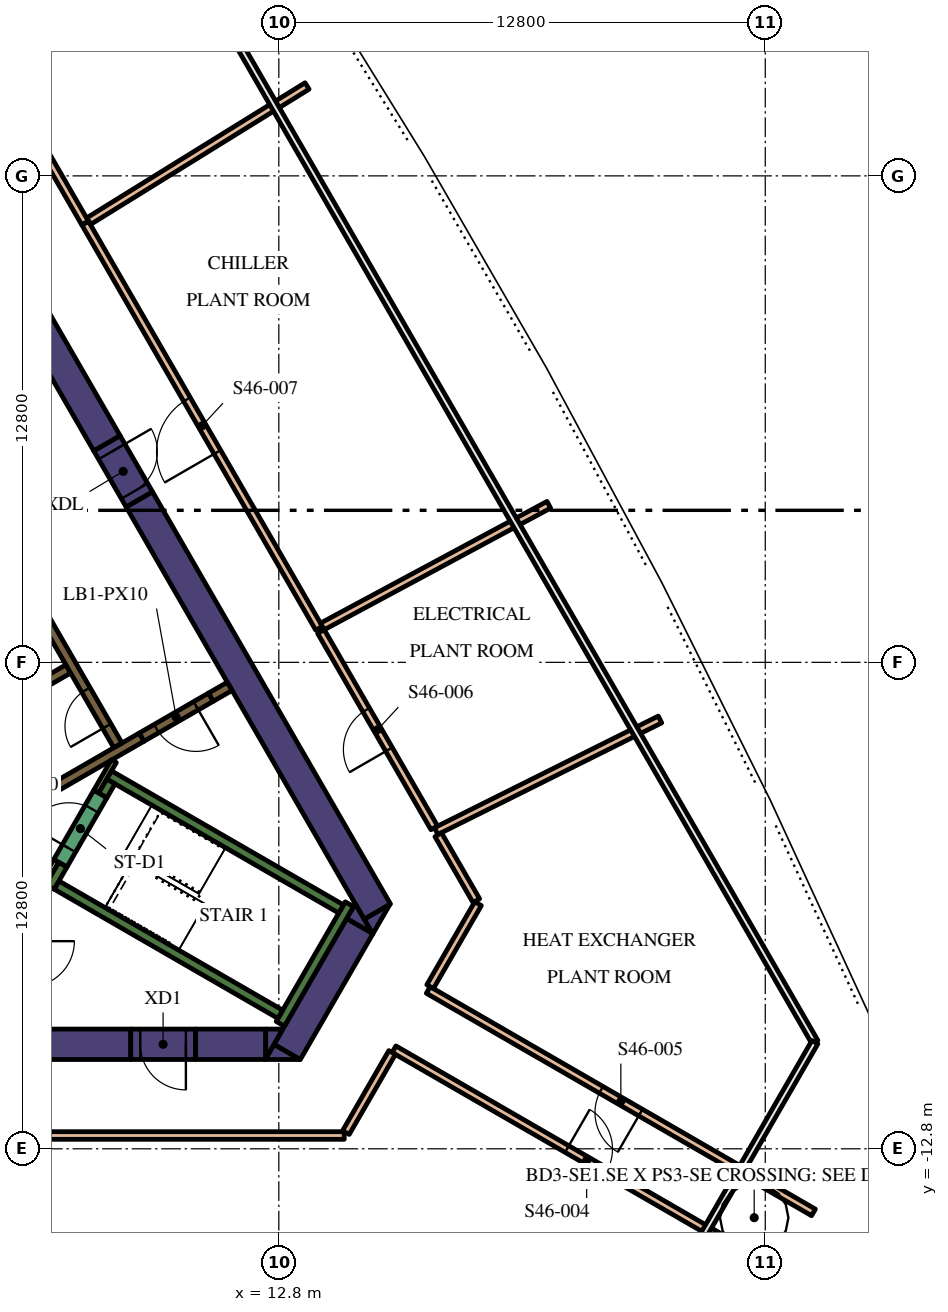
"""IFC4 building model, lengths in metres.
Left out: names, types, materials, properties, quantities, classifications, styles, units other than length and angle.
Written with IfcOpenShell. Run it as: python <this file> out.ifc"""

import sys

from ifc_helpers import new_model, si_unit, direction, frame, frame_2d, origin, place, context, subcontext, project, spatial, polyline, rectangle, outline, extrude, element, fill, save


model = new_model("IFC4")
c1 = context("Model", 3, precision=1e-05, world=origin(), true_north=direction((0.0, 1.0)))
c2 = subcontext(c1, "Body", "Model", "MODEL_VIEW")
j1 = project(units=[si_unit("LENGTHUNIT", "METRE"), si_unit("PLANEANGLEUNIT", "RADIAN")], contexts=[c1])
p1 = place(None, origin())
s1 = spatial("IfcSite", under=j1, at=p1, CompositionType="ELEMENT")
p2 = place(p1, origin())
s2 = spatial("IfcBuilding", under=s1, at=p2, CompositionType="ELEMENT")
p3 = place(p2, frame((0.0, 0.0, 196.2)))
s3 = spatial("IfcBuildingStorey", under=s2, at=p3, CompositionType="ELEMENT", Elevation=196.2)
p4 = place(p3, frame((9.129, 4.289, 0.0), z_axis=(0.0, 0.0, 1.0), x_axis=(0.499995742806, -0.866027861663, 0.0)))
e1 = element("IfcWall", 1, at=p4, inside=s3, PredefinedType="SOLIDWALL", context=c2, shape_type="SweptSolid", body=[
    extrude(rectangle(XDim=12.527, YDim=0.8, at=frame_2d((6.264, 0.0))), origin(), (0.0, 0.0, 1.0), 5.4),
])
p5 = place(p3, origin())
e2 = element("IfcWall", 2, at=p5, inside=s3, PredefinedType="SOLIDWALL", context=c2, shape_type="SweptSolid", body=[
    extrude(outline(polyline([(15.271, -7.15), (15.047, -6.762), (15.719, -6.374), (15.271, -7.15)])), origin(), (0.0, 0.0, 1.0), 5.4),
])
p6 = place(p3, frame((13.018, -10.252, 0.0), z_axis=(0.0, 0.0, 1.0), x_axis=(0.499984020225, 0.866034629516, 0.0)))
e3 = element("IfcWall", 3, at=p6, inside=s3, PredefinedType="SOLIDWALL", context=c2, shape_type="SweptSolid", body=[
    extrude(rectangle(XDim=3.824, YDim=0.8, at=frame_2d((1.912, 0.0))), origin(), (0.0, 0.0, 1.0), 5.4),
])
e4 = element("IfcWall", 4, at=p5, inside=s3, PredefinedType="SOLIDWALL", context=c2, shape_type="SweptSolid", body=[
    extrude(outline(polyline([(12.442, -10.45), (12.671, -10.053), (13.358, -10.45), (12.442, -10.45)])), origin(), (0.0, 0.0, 1.0), 5.4),
])
e5 = element("IfcWall", 5, at=p5, inside=s3, PredefinedType="SOLIDWALL", context=c2, shape_type="SweptSolid", body=[
    extrude(outline(polyline([(14.809, -6.35), (15.257, -7.126), (14.585, -6.738), (14.809, -6.35)])), origin(), (0.0, 0.0, 1.0), 5.4),
])
p7 = place(p3, frame((10.604, -10.05, 0.0), z_axis=(0.0, 0.0, 1.0), x_axis=(1.0, 0.0, 0.0)))
e6 = element("IfcWall", 6, at=p7, inside=s3, PredefinedType="SOLIDWALL", context=c2, shape_type="SweptSolid", body=[
    extrude(rectangle(XDim=1.849, YDim=0.8, at=frame_2d((0.925, 0.0))), origin(), (0.0, 0.0, 1.0), 5.4),
])
e7 = element("IfcWall", 7, at=p5, inside=s3, PredefinedType="SOLIDWALL", context=c2, shape_type="SweptSolid", body=[
    extrude(outline(polyline([(12.904, -9.65), (12.456, -10.426), (12.456, -9.65), (12.904, -9.65)])), origin(), (0.0, 0.0, 1.0), 5.4),
])
p8 = place(p3, frame((8.279, 5.761, 0.0), z_axis=(0.0, 0.0, 1.0), x_axis=(-0.500010359015, 0.866019422922, 0.0)))
e8 = element("IfcWall", 8, at=p8, inside=s3, PredefinedType="SOLIDWALL", context=c2, shape_type="SweptSolid", body=[
    extrude(rectangle(XDim=12.528, YDim=0.8, at=frame_2d((6.264, 0.0))), origin(), (0.0, 0.0, 1.0), 5.4),
])
p9 = place(p3, frame((-13.378, -10.05, 0.0), z_axis=(0.0, 0.0, 1.0), x_axis=(1.0, 0.0, 0.0)))
e9 = element("IfcWall", 9, at=p9, inside=s3, PredefinedType="SOLIDWALL", context=c2, shape_type="SweptSolid", body=[
    extrude(rectangle(XDim=22.282, YDim=0.8, at=frame_2d((11.141, 0.0))), origin(), (0.0, 0.0, 1.0), 5.4),
])
p10 = place(p3, frame((12.84, -9.511, 0.0), z_axis=(0.0, 0.0, 1.0), x_axis=(0.499997733992, 0.866026712061, 0.0)))
e10 = element("IfcWall", 10, at=p10, inside=s3, PredefinedType="SOLIDWALL", context=c2, shape_type="SweptSolid", body=[
    extrude(rectangle(XDim=3.634, YDim=0.25, at=frame_2d((1.817, 0.0))), origin(), (0.0, 0.0, 1.0), 5.4),
])
p11 = place(p3, frame((12.84, -9.261, 0.0), z_axis=(0.0, 0.0, 1.0), x_axis=(-0.866013990052, 0.500019768644, 0.0)))
e11 = element("IfcWall", 11, at=p11, inside=s3, PredefinedType="SOLIDWALL", context=c2, shape_type="SweptSolid", body=[
    extrude(rectangle(XDim=6.8, YDim=0.25, at=frame_2d((3.4, 0.0))), origin(), (0.0, 0.0, 1.0), 5.4),
])
p12 = place(p3, frame((6.78, -5.906, 0.0), z_axis=(0.0, 0.0, 1.0), x_axis=(0.500223362819, 0.865896406789, 0.0)))
e12 = element("IfcWall", 12, at=p12, inside=s3, PredefinedType="SOLIDWALL", context=c2, shape_type="SweptSolid", body=[
    extrude(rectangle(XDim=0.675, YDim=0.25, at=frame_2d((0.337, 0.0))), origin(), (0.0, 0.0, 1.0), 5.4),
])
p13 = place(p3, frame((8.334, -2.964, 0.0), z_axis=(0.0, 0.0, 1.0), x_axis=(0.866016039709, -0.500016218704, 0.0)))
e13 = element("IfcWall", 13, at=p13, inside=s3, PredefinedType="SOLIDWALL", context=c2, shape_type="SweptSolid", body=[
    extrude(rectangle(XDim=7.05, YDim=0.25, at=frame_2d((3.525, 0.0))), origin(), (0.0, 0.0, 1.0), 5.4),
])
p14 = place(p3, frame((8.168, -3.503, 0.0), z_axis=(0.0, 0.0, 1.0), x_axis=(0.49972245349, 0.866185586049, 0.0)))
e14 = element("IfcWall", 14, at=p14, inside=s3, PredefinedType="SOLIDWALL", context=c2, shape_type="SweptSolid", body=[
    extrude(rectangle(XDim=0.425, YDim=0.25, at=frame_2d((0.212, 0.0))), origin(), (0.0, 0.0, 1.0), 5.4),
])
p15 = place(p3, frame((9.19, -1.969, 0.0), z_axis=(0.0, 0.0, 1.0), x_axis=(-0.866057109641, -0.499945079824, 0.0)))
e15 = element("IfcWall", 15, at=p15, inside=s3, PredefinedType="SOLIDWALL", context=c2, shape_type="SweptSolid", body=[
    extrude(rectangle(XDim=3.291, YDim=0.25, at=frame_2d((1.646, 0.0))), origin(), (0.0, 0.0, 1.0), 5.4),
])
p16 = place(p3, frame((11.507, -0.631, 0.0), z_axis=(0.0, 0.0, 1.0), x_axis=(-0.866093731455, -0.499881634324, 0.0)))
e16 = element("IfcWall", 16, at=p16, inside=s3, PredefinedType="SOLIDWALL", context=c2, shape_type="SweptSolid", body=[
    extrude(rectangle(XDim=0.575, YDim=0.25, at=frame_2d((0.288, 0.0))), origin(), (0.0, 0.0, 1.0), 5.4),
])
p17 = place(p3, frame((5.354, -1.274, 0.0), z_axis=(0.0, 0.0, 1.0), x_axis=(0.866008176907, 0.50002983664, 0.0)))
e17 = element("IfcWall", 17, at=p17, inside=s3, PredefinedType="SOLIDWALL", context=c2, shape_type="SweptSolid", body=[
    extrude(rectangle(XDim=2.2, YDim=0.25, at=frame_2d((1.1, 0.0))), origin(), (0.0, 0.0, 1.0), 5.4),
])
p18 = place(p3, frame((6.945, -5.222, 0.0), z_axis=(0.0, 0.0, 1.0), x_axis=(-0.499818422106, -0.866130212453, 0.0)))
e18 = element("IfcWall", 18, at=p18, inside=s3, PredefinedType="PARTITIONING", context=c2, shape_type="SweptSolid", body=[
    extrude(rectangle(XDim=0.514, YDim=0.15, at=frame_2d((0.257, 0.0))), origin(), (0.0, 0.0, 1.0), 4.65),
])
p19 = place(p3, frame((8.459, -2.599, 0.0), z_axis=(0.0, 0.0, 1.0), x_axis=(-0.500041054325, -0.866001699761, 0.0)))
e19 = element("IfcWall", 19, at=p19, inside=s3, PredefinedType="PARTITIONING", context=c2, shape_type="SweptSolid", body=[
    extrude(rectangle(XDim=0.929, YDim=0.15, at=frame_2d((0.464, 0.0))), origin(), (0.0, 0.0, 1.0), 5.4),
])
p20 = place(p3, frame((8.565, -2.185, 0.0), z_axis=(0.0, 0.0, 1.0), x_axis=(-0.499997954832, 0.866026584559, 0.0)))
e20 = element("IfcWall", 20, at=p20, inside=s3, PredefinedType="SOLIDWALL", context=c2, shape_type="SweptSolid", body=[
    extrude(rectangle(XDim=12.35, YDim=0.25, at=frame_2d((6.175, 0.0))), origin(), (0.0, 0.0, 1.0), 5.4),
])
p21 = place(p20, frame((0.585, 0.0, 0.0)))
e21 = element("IfcOpeningElement", 21, at=p21, cuts=e20, PredefinedType="OPENING", context=c2, shape_type="SweptSolid", body=[
    extrude(rectangle(XDim=1.1, YDim=2.1, at=frame_2d((0.55, 1.05))), frame((0.0, 0.135, 0.0), z_axis=(0.0, -1.0, 0.0), x_axis=(1.0, 0.0, 0.0)), (0.0, 0.0, 1.0), 0.27),
])
p22 = place(p3, frame((7.053, -5.284, 0.0), z_axis=(0.0, 0.0, 1.0), x_axis=(0.500078061341, 0.865980330357, 0.0)))
e22 = element("IfcWall", 22, at=p22, inside=s3, PredefinedType="SOLIDWALL", context=c2, shape_type="SweptSolid", body=[
    extrude(rectangle(XDim=2.1, YDim=0.4, at=frame_2d((1.05, 0.0))), origin(), (0.0, 0.0, 1.0), 5.4),
])
p23 = place(p22, frame((0.45, 0.0, 0.0)))
e23 = element("IfcOpeningElement", 23, at=p23, cuts=e22, PredefinedType="OPENING", context=c2, shape_type="SweptSolid", body=[
    extrude(rectangle(XDim=1.2, YDim=2.1, at=frame_2d((0.6, 1.05))), frame((0.0, 0.21, 0.0), z_axis=(0.0, -1.0, 0.0), x_axis=(1.0, 0.0, 0.0)), (0.0, 0.0, 1.0), 0.42),
])
p24 = place(p3, frame((11.009, -0.919, 0.0), z_axis=(0.0, 0.0, 1.0), x_axis=(-0.866059744384, -0.49994051562, 0.0)))
e24 = element("IfcWall", 24, at=p24, inside=s3, PredefinedType="SOLIDWALL", context=c2, shape_type="SweptSolid", body=[
    extrude(rectangle(XDim=2.1, YDim=0.25, at=frame_2d((1.05, 0.0))), origin(), (0.0, 0.0, 1.0), 5.4),
])
p25 = place(p24, frame((0.45, 0.0, 0.0)))
e25 = element("IfcOpeningElement", 25, at=p25, cuts=e24, PredefinedType="OPENING", context=c2, shape_type="SweptSolid", body=[
    extrude(rectangle(XDim=1.2, YDim=2.1, at=frame_2d((0.6, 1.05))), frame((0.0, 0.135, 0.0), z_axis=(0.0, -1.0, 0.0), x_axis=(1.0, 0.0, 0.0)), (0.0, 0.0, 1.0), 0.27),
])
p26 = place(p3, frame((10.604, -10.05, 0.0), z_axis=(0.0, 0.0, 1.0), x_axis=(-1.0, 0.0, 0.0)))
e26 = element("IfcWall", 26, at=p26, inside=s3, PredefinedType="SOLIDWALL", context=c2, shape_type="SweptSolid", body=[
    extrude(rectangle(XDim=1.7, YDim=0.8, at=frame_2d((0.85, 0.0))), origin(), (0.0, 0.0, 1.0), 5.4),
])
p27 = place(p26, frame((0.25, 0.0, 0.0)))
e27 = element("IfcOpeningElement", 27, at=p27, cuts=e26, PredefinedType="OPENING", context=c2, shape_type="SweptSolid", body=[
    extrude(rectangle(XDim=1.2, YDim=2.1, at=frame_2d((0.6, 1.05))), frame((0.0, 0.41, 0.0), z_axis=(0.0, -1.0, 0.0), x_axis=(1.0, 0.0, 0.0)), (0.0, 0.0, 1.0), 0.82),
])
p28 = place(p3, frame((8.279, 5.761, 0.0), z_axis=(0.0, 0.0, 1.0), x_axis=(0.500062241894, -0.865989465428, 0.0)))
e28 = element("IfcWall", 28, at=p28, inside=s3, PredefinedType="SOLIDWALL", context=c2, shape_type="SweptSolid", body=[
    extrude(rectangle(XDim=1.7, YDim=0.8, at=frame_2d((0.85, 0.0))), origin(), (0.0, 0.0, 1.0), 5.4),
])
p29 = place(p28, frame((0.25, 0.0, 0.0)))
e29 = element("IfcOpeningElement", 29, at=p29, cuts=e28, PredefinedType="OPENING", context=c2, shape_type="SweptSolid", body=[
    extrude(rectangle(XDim=1.2, YDim=2.1, at=frame_2d((0.6, 1.05))), frame((0.0, 0.41, 0.0), z_axis=(0.0, -1.0, 0.0), x_axis=(1.0, 0.0, 0.0)), (0.0, 0.0, 1.0), 0.82),
])
p30 = place(p3, frame((13.858, 0.897, 0.0), z_axis=(0.0, 0.0, 1.0), x_axis=(-0.500005845305, 0.86602202897, 0.0)))
e30 = element("IfcWall", 30, at=p30, inside=s3, PredefinedType="PARTITIONING", context=c2, shape_type="SweptSolid", body=[
    extrude(rectangle(XDim=12.304, YDim=0.2, at=frame_2d((6.152, 0.0))), origin(), (0.0, 0.0, 1.0), 4.65),
])
p31 = place(p30, frame((5.352, 0.0, 0.0)))
e31 = element("IfcOpeningElement", 31, at=p31, cuts=e30, PredefinedType="OPENING", context=c2, shape_type="SweptSolid", body=[
    extrude(rectangle(XDim=1.6, YDim=2.1, at=frame_2d((0.8, 1.05))), frame((0.0, 0.11, 0.0), z_axis=(0.0, -1.0, 0.0), x_axis=(1.0, 0.0, 0.0)), (0.0, 0.0, 1.0), 0.22),
])
p32 = place(p3, frame((26.869, -14.474, 0.0), z_axis=(0.0, 0.0, 1.0), x_axis=(-0.866029647556, 0.4999926495, 0.0)))
e32 = element("IfcWall", 32, at=p32, inside=s3, PredefinedType="PARTITIONING", context=c2, shape_type="SweptSolid", body=[
    extrude(rectangle(XDim=11.706, YDim=0.2, at=frame_2d((5.853, 0.0))), origin(), (0.0, 0.0, 1.0), 4.65),
])
p33 = place(p32, frame((5.253, 0.0, 0.0)))
e33 = element("IfcOpeningElement", 33, at=p33, cuts=e32, PredefinedType="OPENING", context=c2, shape_type="SweptSolid", body=[
    extrude(rectangle(XDim=1.2, YDim=2.1, at=frame_2d((0.6, 1.05))), frame((0.0, 0.11, 0.0), z_axis=(0.0, -1.0, 0.0), x_axis=(1.0, 0.0, 0.0)), (0.0, 0.0, 1.0), 0.22),
])
p34 = place(p3, frame((15.831, -10.179, 0.0), z_axis=(0.0, 0.0, 1.0), x_axis=(0.866024433663, -0.500001680296, 0.0)))
e34 = element("IfcWall", 34, at=p34, inside=s3, PredefinedType="PARTITIONING", context=c2, shape_type="SweptSolid", body=[
    extrude(rectangle(XDim=11.706, YDim=0.2, at=frame_2d((5.853, 0.0))), origin(), (0.0, 0.0, 1.0), 4.65),
])
p35 = place(p34, frame((5.253, 0.0, 0.0)))
e35 = element("IfcOpeningElement", 35, at=p35, cuts=e34, PredefinedType="OPENING", context=c2, shape_type="SweptSolid", body=[
    extrude(rectangle(XDim=1.2, YDim=2.1, at=frame_2d((0.6, 1.05))), frame((0.0, 0.11, 0.0), z_axis=(0.0, -1.0, 0.0), x_axis=(1.0, 0.0, 0.0)), (0.0, 0.0, 1.0), 0.22),
])
for number, where, z_axis, x_axis in (
    (36, (3.522, 18.8, 0.0), (0.0, 0.0, 1.0), (0.5, -0.866, 0.0)),
    (37, (14.521, -12.45, 0.0), (0.0, 0.0, 1.0), (-1.0, 0.0, 0.0)),
):
    element("IfcWall", number, at=place(p3, frame(where, z_axis=z_axis, x_axis=x_axis)), inside=s3, PredefinedType="PARTITIONING", context=c2, shape_type="SweptSolid", body=[
        extrude(rectangle(XDim=8.359, YDim=0.2, at=frame_2d((4.179, 0.0))), origin(), (0.0, 0.0, 1.0), 4.65),
    ])
p36 = place(p3, frame((7.8, 11.611, 0.0), z_axis=(0.0, 0.0, 1.0), x_axis=(0.850373744728, 0.526179146562, 0.0)))
e38 = element("IfcWall", 38, at=p36, inside=s3, PredefinedType="PARTITIONING", context=c2, shape_type="SweptSolid", body=[
    extrude(rectangle(XDim=6.754, YDim=0.2, at=frame_2d((3.377, 0.0))), origin(), (0.0, 0.0, 1.0), 4.65),
])
p37 = place(p3, frame((13.946, 0.944, 0.0), z_axis=(0.0, 0.0, 1.0), x_axis=(0.880872932805, 0.473352803152, 0.0)))
e39 = element("IfcWall", 39, at=p37, inside=s3, PredefinedType="PARTITIONING", context=c2, shape_type="SweptSolid", body=[
    extrude(rectangle(XDim=6.764, YDim=0.2, at=frame_2d((3.382, 0.0))), origin(), (0.0, 0.0, 1.0), 4.65),
])
p38 = place(p3, frame((16.94, -4.441, 0.0), z_axis=(0.0, 0.0, 1.0), x_axis=(0.894923674163, 0.446219248153, 0.0)))
e40 = element("IfcWall", 40, at=p38, inside=s3, PredefinedType="PARTITIONING", context=c2, shape_type="SweptSolid", body=[
    extrude(rectangle(XDim=6.582, YDim=0.2, at=frame_2d((3.291, 0.0))), origin(), (0.0, 0.0, 1.0), 4.65),
])
p39 = place(p3, frame((16.89, -4.354, 0.0), z_axis=(0.0, 0.0, 1.0), x_axis=(-0.500004760619, 0.866022655223, 0.0)))
e41 = element("IfcWall", 41, at=p39, inside=s3, PredefinedType="PARTITIONING", context=c2, shape_type="SweptSolid", body=[
    extrude(rectangle(XDim=5.964, YDim=0.2, at=frame_2d((2.982, 0.0))), origin(), (0.0, 0.0, 1.0), 4.65),
])
p40 = place(p39, frame((2.382, 0.0, 0.0)))
e42 = element("IfcOpeningElement", 42, at=p40, cuts=e41, PredefinedType="OPENING", context=c2, shape_type="SweptSolid", body=[
    extrude(rectangle(XDim=1.2, YDim=2.1, at=frame_2d((0.6, 1.05))), frame((0.0, 0.11, 0.0), z_axis=(0.0, -1.0, 0.0), x_axis=(1.0, 0.0, 0.0)), (0.0, 0.0, 1.0), 0.22),
])
p41 = place(p3, frame((18.042, -6.35, 0.0), z_axis=(0.0, 0.0, 1.0), x_axis=(-0.500043699366, -0.866000172474, 0.0)))
e43 = element("IfcWall", 43, at=p41, inside=s3, PredefinedType="PARTITIONING", context=c2, shape_type="SweptSolid", body=[
    extrude(rectangle(XDim=2.522, YDim=0.2, at=frame_2d((1.261, 0.0))), origin(), (0.0, 0.0, 1.0), 4.65),
])
p42 = place(p3, frame((15.781, -10.266, 0.0), z_axis=(0.0, 0.0, 1.0), x_axis=(-0.499983176524, -0.866035116605, 0.0)))
e44 = element("IfcWall", 44, at=p42, inside=s3, PredefinedType="PARTITIONING", context=c2, shape_type="SweptSolid", body=[
    extrude(rectangle(XDim=2.432, YDim=0.2, at=frame_2d((1.216, 0.0))), origin(), (0.0, 0.0, 1.0), 4.65),
])
p43 = place(p3, frame((16.995, -4.536, 0.0), z_axis=(0.0, 0.0, 1.0), x_axis=(0.499989486807, -0.866031473494, 0.0)))
e45 = element("IfcWall", 45, at=p43, inside=s3, PredefinedType="PARTITIONING", context=c2, shape_type="SweptSolid", body=[
    extrude(rectangle(XDim=2.005, YDim=0.2, at=frame_2d((1.002, 0.0))), origin(), (0.0, 0.0, 1.0), 4.65),
])
p44 = place(p21, origin())
e46 = element("IfcDoor", 46, at=p44, inside=s3, OperationType="DOUBLE_DOOR_SLIDING", PredefinedType="DOOR", context=c2, shape_type="SweptSolid", body=[
    extrude(rectangle(XDim=1.1, YDim=2.1, at=frame_2d((0.55, 1.05))), frame((0.0, 0.025, 0.0), z_axis=(0.0, -1.0, 0.0), x_axis=(1.0, 0.0, 0.0)), (0.0, 0.0, 1.0), 0.05),
])
fill(e21, e46)
p45 = place(p23, origin())
e47 = element("IfcDoor", 47, at=p45, inside=s3, OperationType="SINGLE_SWING_LEFT", PredefinedType="DOOR", context=c2, shape_type="SweptSolid", body=[
    extrude(rectangle(XDim=1.2, YDim=2.1, at=frame_2d((0.6, 1.05))), frame((0.0, 0.025, 0.0), z_axis=(0.0, -1.0, 0.0), x_axis=(1.0, 0.0, 0.0)), (0.0, 0.0, 1.0), 0.05),
])
fill(e23, e47)
p46 = place(p25, origin())
e48 = element("IfcDoor", 48, at=p46, inside=s3, OperationType="SINGLE_SWING_LEFT", PredefinedType="DOOR", context=c2, shape_type="SweptSolid", body=[
    extrude(rectangle(XDim=1.2, YDim=2.1, at=frame_2d((0.6, 1.05))), frame((0.0, 0.025, 0.0), z_axis=(0.0, -1.0, 0.0), x_axis=(1.0, 0.0, 0.0)), (0.0, 0.0, 1.0), 0.05),
])
fill(e25, e48)
p47 = place(p27, origin())
e49 = element("IfcDoor", 49, at=p47, inside=s3, OperationType="SINGLE_SWING_LEFT", PredefinedType="DOOR", context=c2, shape_type="SweptSolid", body=[
    extrude(rectangle(XDim=1.2, YDim=2.1, at=frame_2d((0.6, 1.05))), frame((0.0, 0.025, 0.0), z_axis=(0.0, -1.0, 0.0), x_axis=(1.0, 0.0, 0.0)), (0.0, 0.0, 1.0), 0.05),
])
fill(e27, e49)
p48 = place(p29, origin())
e50 = element("IfcDoor", 50, at=p48, inside=s3, OperationType="SINGLE_SWING_LEFT", PredefinedType="DOOR", context=c2, shape_type="SweptSolid", body=[
    extrude(rectangle(XDim=1.2, YDim=2.1, at=frame_2d((0.6, 1.05))), frame((0.0, 0.025, 0.0), z_axis=(0.0, -1.0, 0.0), x_axis=(1.0, 0.0, 0.0)), (0.0, 0.0, 1.0), 0.05),
])
fill(e29, e50)
p49 = place(p35, origin())
e51 = element("IfcDoor", 51, at=p49, inside=s3, OperationType="SINGLE_SWING_RIGHT", PredefinedType="DOOR", context=c2, shape_type="SweptSolid", body=[
    extrude(rectangle(XDim=1.2, YDim=2.1, at=frame_2d((0.6, 1.05))), frame((0.0, 0.025, 0.0), z_axis=(0.0, -1.0, 0.0), x_axis=(1.0, 0.0, 0.0)), (0.0, 0.0, 1.0), 0.05),
])
fill(e35, e51)
p50 = place(p33, origin())
e52 = element("IfcDoor", 52, at=p50, inside=s3, OperationType="SINGLE_SWING_RIGHT", PredefinedType="DOOR", context=c2, shape_type="SweptSolid", body=[
    extrude(rectangle(XDim=1.2, YDim=2.1, at=frame_2d((0.6, 1.05))), frame((0.0, 0.025, 0.0), z_axis=(0.0, -1.0, 0.0), x_axis=(1.0, 0.0, 0.0)), (0.0, 0.0, 1.0), 0.05),
])
fill(e33, e52)
p51 = place(p40, origin())
e53 = element("IfcDoor", 53, at=p51, inside=s3, OperationType="SINGLE_SWING_RIGHT", PredefinedType="DOOR", context=c2, shape_type="SweptSolid", body=[
    extrude(rectangle(XDim=1.2, YDim=2.1, at=frame_2d((0.6, 1.05))), frame((0.0, 0.025, 0.0), z_axis=(0.0, -1.0, 0.0), x_axis=(1.0, 0.0, 0.0)), (0.0, 0.0, 1.0), 0.05),
])
fill(e42, e53)
p52 = place(p31, origin())
e54 = element("IfcDoor", 54, at=p52, inside=s3, OperationType="DOUBLE_DOOR_SINGLE_SWING", PredefinedType="DOOR", context=c2, shape_type="SweptSolid", body=[
    extrude(rectangle(XDim=1.6, YDim=2.1, at=frame_2d((0.8, 1.05))), frame((0.0, 0.025, 0.0), z_axis=(0.0, -1.0, 0.0), x_axis=(1.0, 0.0, 0.0)), (0.0, 0.0, 1.0), 0.05),
])
fill(e31, e54)
save(model, sys.argv[1])
